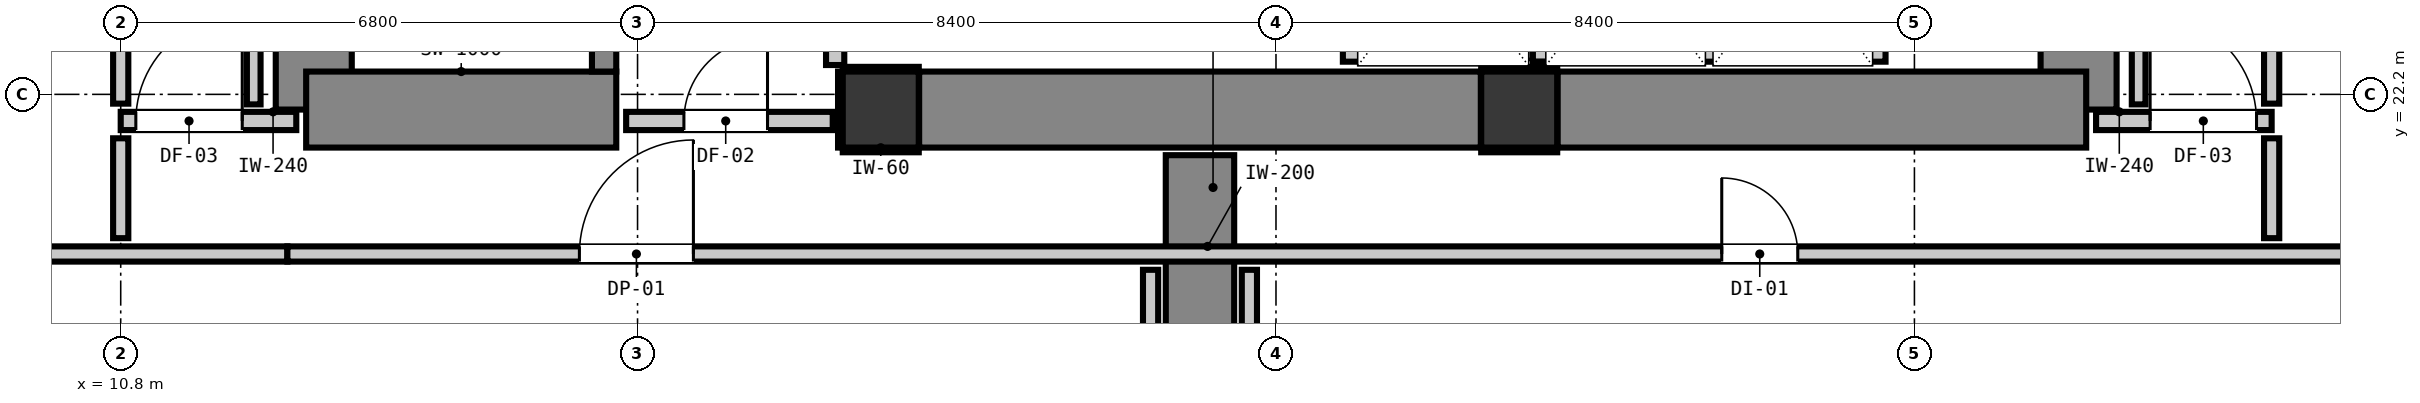
"""IFC4 building model, lengths in metres.
Left out: names, types, materials, properties, quantities, classifications, styles, units other than length and angle.
Written with IfcOpenShell. Run it as: python <this file> out.ifc"""

import sys

from ifc_helpers import new_model, si_unit, direction, frame, frame_2d, origin, origin_2d, place, context, subcontext, project, spatial, rectangle, extrude, element, fill, save


model = new_model("IFC4")
c1 = context("Model", 3, precision=1e-05, world=origin(), true_north=direction((0.0, 1.0)))
c2 = subcontext(c1, "Body", "Model", "MODEL_VIEW")
j1 = project(units=[si_unit("LENGTHUNIT", "METRE"), si_unit("PLANEANGLEUNIT", "RADIAN")], contexts=[c1])
p1 = place(None, origin())
s1 = spatial("IfcSite", under=j1, at=p1, CompositionType="ELEMENT")
p2 = place(p1, origin())
s2 = spatial("IfcBuilding", under=s1, at=p2, CompositionType="ELEMENT")
p3 = place(p2, frame((0.0, 0.0, 88.4)))
s3 = spatial("IfcBuildingStorey", under=s2, at=p3, CompositionType="ELEMENT", Elevation=88.4)
for number, where, z_axis, x_axis in (
    (1, (20.8, 22.0, 0.0), (0.0, 0.0, 1.0), (1.0, 0.0, 0.0)),
    (2, (29.2, 22.0, 0.0), (0.0, 0.0, 1.0), (1.0, 0.0, 0.0)),
):
    element("IfcColumn", number, at=place(p3, frame(where, z_axis=z_axis, x_axis=x_axis)), inside=s3, PredefinedType="COLUMN", context=c2, shape_type="SweptSolid", body=[
        extrude(rectangle(XDim=1.0, YDim=1.0, at=origin_2d()), origin(), (0.0, 0.0, 1.0), 4.4),
    ])
p4 = place(p3, frame((13.34, 22.0, 0.0), z_axis=(0.0, 0.0, 1.0), x_axis=(0.0, 1.0, 0.0)))
e3 = element("IfcWall", 3, at=p4, inside=s3, PredefinedType="SHEAR", context=c2, shape_type="SweptSolid", body=[
    extrude(rectangle(XDim=8.195, YDim=1.0, at=frame_2d((4.098, 0.0))), origin(), (0.0, 0.0, 1.0), 4.4),
])
p5 = place(p3, frame((13.24, 22.0, 0.0), z_axis=(0.0, 0.0, 1.0), x_axis=(1.0, 0.0, 0.0)))
e4 = element("IfcWall", 4, at=p5, inside=s3, PredefinedType="SHEAR", context=c2, shape_type="SweptSolid", body=[
    extrude(rectangle(XDim=4.08, YDim=1.0, at=frame_2d((2.04, 0.0))), origin(), (0.0, 0.0, 1.0), 4.4),
])
p6 = place(p3, frame((36.56, 22.0, 0.0), z_axis=(0.0, 0.0, 1.0), x_axis=(0.0, 1.0, 0.0)))
e5 = element("IfcWall", 5, at=p6, inside=s3, PredefinedType="SHEAR", context=c2, shape_type="SweptSolid", body=[
    extrude(rectangle(XDim=8.195, YDim=1.0, at=frame_2d((4.098, 0.0))), origin(), (0.0, 0.0, 1.0), 4.4),
])
p7 = place(p3, frame((29.705, 22.0, 0.0), z_axis=(0.0, 0.0, 1.0), x_axis=(1.0, 0.0, 0.0)))
e6 = element("IfcWall", 6, at=p7, inside=s3, PredefinedType="SHEAR", context=c2, shape_type="SweptSolid", body=[
    extrude(rectangle(XDim=6.955, YDim=1.0, at=frame_2d((3.478, 0.0))), origin(), (0.0, 0.0, 1.0), 4.4),
])
p8 = place(p3, frame((21.305, 22.0, 0.0), z_axis=(0.0, 0.0, 1.0), x_axis=(1.0, 0.0, 0.0)))
e7 = element("IfcWall", 7, at=p8, inside=s3, PredefinedType="SHEAR", context=c2, shape_type="SweptSolid", body=[
    extrude(rectangle(XDim=7.39, YDim=1.0, at=frame_2d((3.695, 0.0))), origin(), (0.0, 0.0, 1.0), 4.4),
])
p9 = place(p3, frame((17.16, 22.5, 0.0), z_axis=(0.0, 0.0, 1.0), x_axis=(0.0, 1.0, 0.0)))
e8 = element("IfcWall", 8, at=p9, inside=s3, PredefinedType="SHEAR", context=c2, shape_type="SweptSolid", body=[
    extrude(rectangle(XDim=7.9, YDim=0.32, at=frame_2d((3.95, 0.0))), origin(), (0.0, 0.0, 1.0), 4.4),
])
p10 = place(p9, frame((0.29, 0.0, 0.0)))
e9 = element("IfcOpeningElement", 9, at=p10, cuts=e8, PredefinedType="OPENING", context=c2, shape_type="SweptSolid", body=[
    extrude(rectangle(XDim=1.1, YDim=2.15, at=frame_2d((0.55, 1.075))), frame((0.0, 0.17, 0.0), z_axis=(0.0, -1.0, 0.0), x_axis=(1.0, 0.0, 0.0)), (0.0, 0.0, 1.0), 0.34),
])
p11 = place(p3, frame((25.0, 15.15, 0.0), z_axis=(0.0, 0.0, 1.0), x_axis=(0.0, 1.0, 0.0)))
e10 = element("IfcWall", 10, at=p11, inside=s3, PredefinedType="SHEAR", context=c2, shape_type="SweptSolid", body=[
    extrude(rectangle(XDim=6.25, YDim=0.9, at=frame_2d((3.125, 0.0))), origin(), (0.0, 0.0, 1.0), 4.14),
])
p12 = place(p3, frame((29.5, 22.632, 0.0), z_axis=(0.0, 0.0, 1.0), x_axis=(0.0, 1.0, 0.0)))
e11 = element("IfcWall", 11, at=p12, inside=s3, PredefinedType="PARTITIONING", context=c2, shape_type="SweptSolid", body=[
    extrude(rectangle(XDim=2.52, YDim=0.24, at=frame_2d((1.26, 0.0))), origin(), (0.0, 0.0, 1.0), 3.375),
])
for number, where, z_axis, x_axis in (
    (12, (31.7, 22.63, 0.0), (0.0, 0.0, 1.0), (0.0, 1.0, 0.0)),
    (13, (33.9, 22.63, 0.0), (0.0, 0.0, 1.0), (0.0, 1.0, 0.0)),
):
    element("IfcWall", number, at=place(p3, frame(where, z_axis=z_axis, x_axis=x_axis)), inside=s3, PredefinedType="PARTITIONING", context=c2, shape_type="SweptSolid", body=[
        extrude(rectangle(XDim=2.522, YDim=0.24, at=frame_2d((1.261, 0.0))), origin(), (0.0, 0.0, 1.0), 4.14),
    ])
p13 = place(p3, frame((27.0, 22.63, 0.0), z_axis=(0.0, 0.0, 1.0), x_axis=(0.0, 1.0, 0.0)))
e14 = element("IfcWall", 14, at=p13, inside=s3, PredefinedType="PARTITIONING", context=c2, shape_type="SweptSolid", body=[
    extrude(rectangle(XDim=2.868, YDim=0.24, at=frame_2d((1.434, 0.0))), origin(), (0.0, 0.0, 1.0), 4.14),
])
p14 = place(p3, frame((10.8, 21.85, 0.0), z_axis=(0.0, 0.0, 1.0), x_axis=(1.0, 0.0, 0.0)))
e15 = element("IfcWall", 15, at=p14, inside=s3, PredefinedType="PARTITIONING", context=c2, shape_type="SweptSolid", body=[
    extrude(rectangle(XDim=2.31, YDim=0.24, at=frame_2d((1.155, 0.0))), origin(), (0.0, 0.0, 1.0), 3.878),
])
p15 = place(p14, frame((0.199, 0.0, 0.0)))
e16 = element("IfcOpeningElement", 16, at=p15, cuts=e15, PredefinedType="OPENING", context=c2, shape_type="SweptSolid", body=[
    extrude(rectangle(XDim=1.4, YDim=2.15, at=frame_2d((0.7, 1.075))), frame((0.0, 0.13, 0.0), z_axis=(0.0, -1.0, 0.0), x_axis=(1.0, 0.0, 0.0)), (0.0, 0.0, 1.0), 0.26),
])
p16 = place(p3, frame((17.45, 21.85, 0.0), z_axis=(0.0, 0.0, 1.0), x_axis=(1.0, 0.0, 0.0)))
e17 = element("IfcWall", 17, at=p16, inside=s3, PredefinedType="PARTITIONING", context=c2, shape_type="SweptSolid", body=[
    extrude(rectangle(XDim=2.718, YDim=0.24, at=frame_2d((1.359, 0.0))), origin(), (0.0, 0.0, 1.0), 3.878),
])
p17 = place(p16, frame((0.76, 0.0, 0.0)))
e18 = element("IfcOpeningElement", 18, at=p17, cuts=e17, PredefinedType="OPENING", context=c2, shape_type="SweptSolid", body=[
    extrude(rectangle(XDim=1.1, YDim=2.15, at=frame_2d((0.55, 1.075))), frame((0.0, 0.13, 0.0), z_axis=(0.0, -1.0, 0.0), x_axis=(1.0, 0.0, 0.0)), (0.0, 0.0, 1.0), 0.26),
])
p18 = place(p3, frame((36.79, 21.85, 0.0), z_axis=(0.0, 0.0, 1.0), x_axis=(1.0, 0.0, 0.0)))
e19 = element("IfcWall", 19, at=p18, inside=s3, PredefinedType="PARTITIONING", context=c2, shape_type="SweptSolid", body=[
    extrude(rectangle(XDim=2.31, YDim=0.24, at=frame_2d((1.155, 0.0))), origin(), (0.0, 0.0, 1.0), 3.878),
])
p19 = place(p18, frame((0.711, 0.0, 0.0)))
e20 = element("IfcOpeningElement", 20, at=p19, cuts=e19, PredefinedType="OPENING", context=c2, shape_type="SweptSolid", body=[
    extrude(rectangle(XDim=1.4, YDim=2.15, at=frame_2d((0.7, 1.075))), frame((0.0, 0.13, 0.0), z_axis=(0.0, -1.0, 0.0), x_axis=(1.0, 0.0, 0.0)), (0.0, 0.0, 1.0), 0.26),
])
p20 = place(p3, frame((2.95, 20.1, 0.0), z_axis=(0.0, 0.0, 1.0), x_axis=(1.0, 0.0, 0.0)))
e21 = element("IfcWall", 21, at=p20, inside=s3, PredefinedType="PARTITIONING", context=c2, shape_type="SweptSolid", body=[
    extrude(rectangle(XDim=10.043, YDim=0.2, at=frame_2d((5.021, 0.0))), origin(), (0.0, 0.0, 1.0), 3.525),
])
p21 = place(p3, frame((12.993, 20.1, 0.0), z_axis=(0.0, 0.0, 1.0), x_axis=(1.0, 0.0, 0.0)))
e22 = element("IfcWall", 22, at=p21, inside=s3, PredefinedType="PARTITIONING", context=c2, shape_type="SweptSolid", body=[
    extrude(rectangle(XDim=29.857, YDim=0.2, at=frame_2d((14.929, 0.0))), origin(), (0.0, 0.0, 1.0), 4.14),
])
p22 = place(p21, frame((18.872, 0.0, 0.0)))
e23 = element("IfcOpeningElement", 23, at=p22, cuts=e22, PredefinedType="OPENING", context=c2, shape_type="SweptSolid", body=[
    extrude(rectangle(XDim=1.0, YDim=2.15, at=frame_2d((0.5, 1.075))), frame((0.0, 0.11, 0.0), z_axis=(0.0, -1.0, 0.0), x_axis=(1.0, 0.0, 0.0)), (0.0, 0.0, 1.0), 0.22),
])
p23 = place(p21, frame((3.842, 0.0, 0.0)))
e24 = element("IfcOpeningElement", 24, at=p23, cuts=e22, PredefinedType="OPENING", context=c2, shape_type="SweptSolid", body=[
    extrude(rectangle(XDim=1.5, YDim=2.15, at=frame_2d((0.75, 1.075))), frame((0.0, 0.11, 0.0), z_axis=(0.0, -1.0, 0.0), x_axis=(1.0, 0.0, 0.0)), (0.0, 0.0, 1.0), 0.22),
])
p24 = place(p3, frame((20.2, 22.586, 0.0), z_axis=(0.0, 0.0, 1.0), x_axis=(0.0, 1.0, 0.0)))
e25 = element("IfcWall", 25, at=p24, inside=s3, PredefinedType="PARTITIONING", context=c2, shape_type="SweptSolid", body=[
    extrude(rectangle(XDim=5.566, YDim=0.24, at=frame_2d((2.783, 0.0))), origin(), (0.0, 0.0, 1.0), 4.14),
])
p25 = place(p3, frame((10.8, 20.308, 0.0), z_axis=(0.0, 0.0, 1.0), x_axis=(0.0, 1.0, 0.0)))
e26 = element("IfcWall", 26, at=p25, inside=s3, PredefinedType="PARTITIONING", context=c2, shape_type="SweptSolid", body=[
    extrude(rectangle(XDim=1.314, YDim=0.2, at=frame_2d((0.657, 0.0))), origin(), (0.0, 0.0, 1.0), 4.14),
])
p26 = place(p3, frame((10.8, 22.078, 0.0), z_axis=(0.0, 0.0, 1.0), x_axis=(0.0, 1.0, 0.0)))
e27 = element("IfcWall", 27, at=p26, inside=s3, PredefinedType="PARTITIONING", context=c2, shape_type="SweptSolid", body=[
    extrude(rectangle(XDim=0.914, YDim=0.2, at=frame_2d((0.457, 0.0))), origin(), (0.0, 0.0, 1.0), 4.14),
])
for number, where, z_axis, x_axis in (
    (28, (24.35, 15.358, 0.0), (0.0, 0.0, 1.0), (0.0, 1.0, 0.0)),
    (29, (25.65, 15.358, 0.0), (0.0, 0.0, 1.0), (0.0, 1.0, 0.0)),
):
    element("IfcWall", number, at=place(p3, frame(where, z_axis=z_axis, x_axis=x_axis)), inside=s3, PredefinedType="PARTITIONING", context=c2, shape_type="SweptSolid", body=[
        extrude(rectangle(XDim=4.534, YDim=0.2, at=frame_2d((2.267, 0.0))), origin(), (0.0, 0.0, 1.0), 4.14),
    ])
p27 = place(p3, frame((39.1, 20.308, 0.0), z_axis=(0.0, 0.0, 1.0), x_axis=(0.0, 1.0, 0.0)))
e30 = element("IfcWall", 30, at=p27, inside=s3, PredefinedType="PARTITIONING", context=c2, shape_type="SweptSolid", body=[
    extrude(rectangle(XDim=1.314, YDim=0.2, at=frame_2d((0.657, 0.0))), origin(), (0.0, 0.0, 1.0), 4.14),
])
p28 = place(p3, frame((39.1, 22.078, 0.0), z_axis=(0.0, 0.0, 1.0), x_axis=(0.0, 1.0, 0.0)))
e31 = element("IfcWall", 31, at=p28, inside=s3, PredefinedType="PARTITIONING", context=c2, shape_type="SweptSolid", body=[
    extrude(rectangle(XDim=0.914, YDim=0.2, at=frame_2d((0.457, 0.0))), origin(), (0.0, 0.0, 1.0), 4.14),
])
for number, where, z_axis, x_axis in (
    (32, (12.55, 22.068, 0.0), (0.0, 0.0, 1.0), (0.0, 1.0, 0.0)),
    (33, (37.35, 22.068, 0.0), (0.0, 0.0, 1.0), (0.0, 1.0, 0.0)),
):
    element("IfcWall", number, at=place(p3, frame(where, z_axis=z_axis, x_axis=x_axis)), inside=s3, PredefinedType="PARTITIONING", context=c2, shape_type="SweptSolid", body=[
        extrude(rectangle(XDim=17.294, YDim=0.18, at=frame_2d((8.647, 0.0))), origin(), (0.0, 0.0, 1.0), 4.14),
    ])
for number, where, z_axis, x_axis in (
    (34, (20.3, 21.468, 0.0), (0.0, 0.0, 1.0), (1.0, 0.0, 0.0)),
    (35, (20.3, 22.532, 0.0), (0.0, 0.0, 1.0), (1.0, 0.0, 0.0)),
    (36, (20.268, 21.5, 0.0), (0.0, 0.0, 1.0), (0.0, 1.0, 0.0)),
    (37, (28.7, 21.468, 0.0), (0.0, 0.0, 1.0), (1.0, 0.0, 0.0)),
    (38, (28.7, 22.532, 0.0), (0.0, 0.0, 1.0), (1.0, 0.0, 0.0)),
):
    element("IfcWall", number, at=place(p3, frame(where, z_axis=z_axis, x_axis=x_axis)), inside=s3, PredefinedType="PARTITIONING", context=c2, shape_type="SweptSolid", body=[
        extrude(rectangle(XDim=1.0, YDim=0.06, at=frame_2d((0.5, 0.0))), origin(), (0.0, 0.0, 1.0), 1.45),
    ])
p29 = place(p17, origin())
e39 = element("IfcDoor", 39, at=p29, inside=s3, OperationType="SINGLE_SWING_RIGHT", PredefinedType="DOOR", context=c2, shape_type="SweptSolid", body=[
    extrude(rectangle(XDim=1.1, YDim=2.15, at=frame_2d((0.55, 1.075))), frame((0.0, 0.025, 0.0), z_axis=(0.0, -1.0, 0.0), x_axis=(1.0, 0.0, 0.0)), (0.0, 0.0, 1.0), 0.05),
])
fill(e18, e39)
p30 = place(p15, origin())
e40 = element("IfcDoor", 40, at=p30, inside=s3, OperationType="SINGLE_SWING_RIGHT", PredefinedType="DOOR", context=c2, shape_type="SweptSolid", body=[
    extrude(rectangle(XDim=1.4, YDim=2.15, at=frame_2d((0.7, 1.075))), frame((0.0, 0.025, 0.0), z_axis=(0.0, -1.0, 0.0), x_axis=(1.0, 0.0, 0.0)), (0.0, 0.0, 1.0), 0.05),
])
fill(e16, e40)
p31 = place(p19, origin())
e41 = element("IfcDoor", 41, at=p31, inside=s3, OperationType="SINGLE_SWING_LEFT", PredefinedType="DOOR", context=c2, shape_type="SweptSolid", body=[
    extrude(rectangle(XDim=1.4, YDim=2.15, at=frame_2d((0.7, 1.075))), frame((0.0, 0.025, 0.0), z_axis=(0.0, -1.0, 0.0), x_axis=(1.0, 0.0, 0.0)), (0.0, 0.0, 1.0), 0.05),
])
fill(e20, e41)
p32 = place(p22, origin())
e42 = element("IfcDoor", 42, at=p32, inside=s3, OperationType="SINGLE_SWING_LEFT", PredefinedType="DOOR", context=c2, shape_type="SweptSolid", body=[
    extrude(rectangle(XDim=1.0, YDim=2.15, at=frame_2d((0.5, 1.075))), frame((0.0, 0.025, 0.0), z_axis=(0.0, -1.0, 0.0), x_axis=(1.0, 0.0, 0.0)), (0.0, 0.0, 1.0), 0.05),
])
fill(e23, e42)
p33 = place(p23, origin())
e43 = element("IfcDoor", 43, at=p33, inside=s3, OperationType="SINGLE_SWING_RIGHT", PredefinedType="DOOR", context=c2, shape_type="SweptSolid", body=[
    extrude(rectangle(XDim=1.5, YDim=2.15, at=frame_2d((0.75, 1.075))), frame((0.0, 0.025, 0.0), z_axis=(0.0, -1.0, 0.0), x_axis=(1.0, 0.0, 0.0)), (0.0, 0.0, 1.0), 0.05),
])
fill(e24, e43)
save(model, sys.argv[1])
